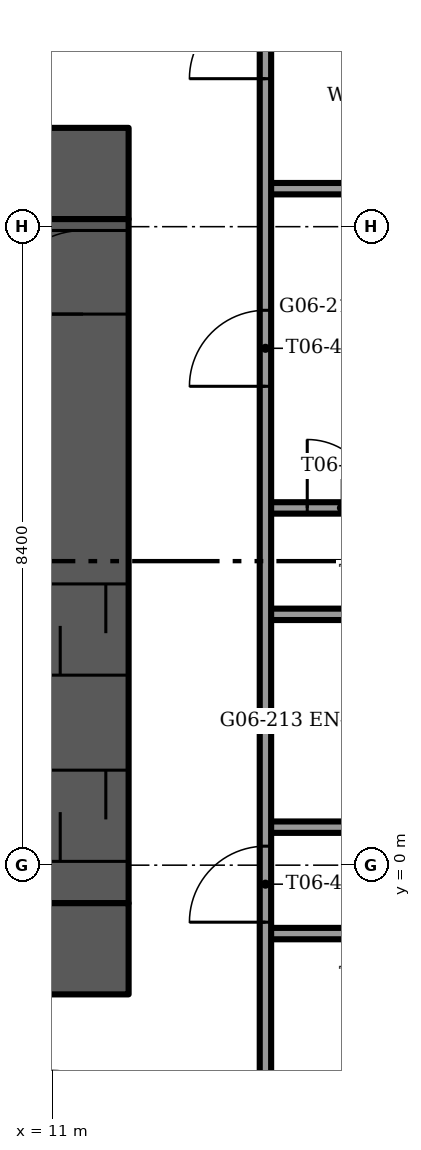
"""IFC4 building model, lengths in metres.
Left out: names, types, materials, properties, quantities, classifications, styles, units other than length and angle.
Written with IfcOpenShell. Run it as: python <this file> out.ifc"""

import sys

from ifc_helpers import new_model, si_unit, direction, frame, frame_2d, origin, place, context, subcontext, project, spatial, rectangle, extrude, element, fill, save


model = new_model("IFC4")
c1 = context("Model", 3, precision=1e-05, world=origin(), true_north=direction((0.0, 1.0)))
c2 = subcontext(c1, "Body", "Model", "MODEL_VIEW")
j1 = project(units=[si_unit("LENGTHUNIT", "METRE"), si_unit("PLANEANGLEUNIT", "RADIAN")], contexts=[c1])
p1 = place(None, origin())
s1 = spatial("IfcSite", under=j1, at=p1, CompositionType="ELEMENT")
p2 = place(p1, origin())
s2 = spatial("IfcBuilding", under=s1, at=p2, CompositionType="ELEMENT")
p3 = place(p2, frame((0.0, 0.0, 28.0)))
s3 = spatial("IfcBuildingStorey", under=s2, at=p3, CompositionType="ELEMENT", Elevation=28.0)
p4 = place(p3, frame((-12.0, -1.1, -0.3), z_axis=(0.0, 0.0, 1.0), x_axis=(1.0, 0.0, 0.0)))
e1 = element("IfcWall", 1, at=p4, inside=s3, PredefinedType="SHEAR", context=c2, shape_type="SweptSolid", body=[
    extrude(rectangle(XDim=24.0, YDim=1.2, at=frame_2d((12.0, 0.0))), origin(), (0.0, 0.0, 1.0), 3.75),
])
p5 = place(p4, frame((11.2, 0.0, 0.0)))
e2 = element("IfcOpeningElement", 2, at=p5, cuts=e1, PredefinedType="OPENING", context=c2, shape_type="SweptSolid", body=[
    extrude(rectangle(XDim=1.6, YDim=2.1, at=frame_2d((0.8, 1.05))), frame((0.0, 0.6, 0.0), z_axis=(0.0, -1.0, 0.0), x_axis=(1.0, 0.0, 0.0)), (0.0, 0.0, 1.0), 1.2),
])
p6 = place(p3, frame((-12.0, 9.1, -0.3), z_axis=(0.0, 0.0, 1.0), x_axis=(1.0, 0.0, 0.0)))
e3 = element("IfcWall", 3, at=p6, inside=s3, PredefinedType="SHEAR", context=c2, shape_type="SweptSolid", body=[
    extrude(rectangle(XDim=24.0, YDim=1.2, at=frame_2d((12.0, 0.0))), origin(), (0.0, 0.0, 1.0), 3.75),
])
p7 = place(p6, frame((11.2, 0.0, 0.0)))
e4 = element("IfcOpeningElement", 4, at=p7, cuts=e3, PredefinedType="OPENING", context=c2, shape_type="SweptSolid", body=[
    extrude(rectangle(XDim=1.6, YDim=2.1, at=frame_2d((0.8, 1.05))), frame((0.0, 0.6, 0.0), z_axis=(0.0, -1.0, 0.0), x_axis=(1.0, 0.0, 0.0)), (0.0, 0.0, 1.0), 1.2),
])
p8 = place(p6, frame((5.25, 0.0, 0.0)))
e5 = element("IfcOpeningElement", 5, at=p8, cuts=e3, PredefinedType="OPENING", context=c2, shape_type="SweptSolid", body=[
    extrude(rectangle(XDim=1.1, YDim=2.1, at=frame_2d((0.55, 1.05))), frame((0.0, 0.6, 0.0), z_axis=(0.0, -1.0, 0.0), x_axis=(1.0, 0.0, 0.0)), (0.0, 0.0, 1.0), 1.2),
])
p9 = place(p6, frame((17.65, 0.0, 0.0)))
e6 = element("IfcOpeningElement", 6, at=p9, cuts=e3, PredefinedType="OPENING", context=c2, shape_type="SweptSolid", body=[
    extrude(rectangle(XDim=1.1, YDim=2.1, at=frame_2d((0.55, 1.05))), frame((0.0, 0.6, 0.0), z_axis=(0.0, -1.0, 0.0), x_axis=(1.0, 0.0, 0.0)), (0.0, 0.0, 1.0), 1.2),
])
p10 = place(p3, frame((11.4, -0.5, -0.3), z_axis=(0.0, 0.0, 1.0), x_axis=(0.0, 1.0, 0.0)))
e7 = element("IfcWall", 7, at=p10, inside=s3, PredefinedType="SHEAR", context=c2, shape_type="SweptSolid", body=[
    extrude(rectangle(XDim=9.0, YDim=1.2, at=frame_2d((4.5, 0.0))), origin(), (0.0, 0.0, 1.0), 3.75),
])
p11 = place(p10, frame((7.75, 0.0, 0.0)))
e8 = element("IfcOpeningElement", 8, at=p11, cuts=e7, PredefinedType="OPENING", context=c2, shape_type="SweptSolid", body=[
    extrude(rectangle(XDim=1.1, YDim=2.1, at=frame_2d((0.55, 1.05))), frame((0.0, 0.6, 0.0), z_axis=(0.0, -1.0, 0.0), x_axis=(1.0, 0.0, 0.0)), (0.0, 0.0, 1.0), 1.2),
])
p12 = place(p10, frame((0.55, 0.0, 0.0)))
e9 = element("IfcOpeningElement", 9, at=p12, cuts=e7, PredefinedType="OPENING", context=c2, shape_type="SweptSolid", body=[
    extrude(rectangle(XDim=1.2, YDim=2.1, at=frame_2d((0.6, 1.05))), frame((0.0, 0.6, 0.0), z_axis=(0.0, -1.0, 0.0), x_axis=(1.0, 0.0, 0.0)), (0.0, 0.0, 1.0), 1.2),
])
p13 = place(p10, frame((3.0, 0.0, 0.0)))
e10 = element("IfcOpeningElement", 10, at=p13, cuts=e7, PredefinedType="OPENING", context=c2, shape_type="SweptSolid", body=[
    extrude(rectangle(XDim=1.2, YDim=2.1, at=frame_2d((0.6, 1.05))), frame((0.0, 0.6, 0.0), z_axis=(0.0, -1.0, 0.0), x_axis=(1.0, 0.0, 0.0)), (0.0, 0.0, 1.0), 1.2),
])
p14 = place(p3, frame((10.945, -17.893, 0.0), z_axis=(0.0, 0.0, 1.0), x_axis=(0.500003237297, 0.866023534722, 0.0)))
e11 = element("IfcWall", 11, at=p14, inside=s3, PredefinedType="SOLIDWALL", context=c2, shape_type="SweptSolid", body=[
    extrude(rectangle(XDim=20.046, YDim=0.15, at=frame_2d((10.023, 0.0))), origin(), (0.0, 0.0, 1.0), 3.45),
])
p15 = place(p14, frame((1.923, 0.0, 0.15)))
e12 = element("IfcOpeningElement", 12, at=p15, cuts=e11, PredefinedType="OPENING", context=c2, shape_type="SweptSolid", body=[
    extrude(rectangle(XDim=1.8, YDim=2.85, at=frame_2d((0.9, 1.425))), frame((0.0, 0.075, 0.0), z_axis=(0.0, -1.0, 0.0), x_axis=(1.0, 0.0, 0.0)), (0.0, 0.0, 1.0), 0.15),
])
p16 = place(p14, frame((4.023, 0.0, 0.0)))
e13 = element("IfcOpeningElement", 13, at=p16, cuts=e11, PredefinedType="OPENING", context=c2, shape_type="SweptSolid", body=[
    extrude(rectangle(XDim=1.5, YDim=2.4, at=frame_2d((0.75, 1.2))), frame((0.0, 0.075, 0.0), z_axis=(0.0, -1.0, 0.0), x_axis=(1.0, 0.0, 0.0)), (0.0, 0.0, 1.0), 0.15),
])
p17 = place(p14, frame((6.123, 0.0, 0.15)))
e14 = element("IfcOpeningElement", 14, at=p17, cuts=e11, PredefinedType="OPENING", context=c2, shape_type="SweptSolid", body=[
    extrude(rectangle(XDim=1.8, YDim=2.85, at=frame_2d((0.9, 1.425))), frame((0.0, 0.075, 0.0), z_axis=(0.0, -1.0, 0.0), x_axis=(1.0, 0.0, 0.0)), (0.0, 0.0, 1.0), 0.15),
])
p18 = place(p14, frame((8.223, 0.0, 0.0)))
e15 = element("IfcOpeningElement", 15, at=p18, cuts=e11, PredefinedType="OPENING", context=c2, shape_type="SweptSolid", body=[
    extrude(rectangle(XDim=1.5, YDim=2.4, at=frame_2d((0.75, 1.2))), frame((0.0, 0.075, 0.0), z_axis=(0.0, -1.0, 0.0), x_axis=(1.0, 0.0, 0.0)), (0.0, 0.0, 1.0), 0.15),
])
p19 = place(p14, frame((10.323, 0.0, 0.15)))
e16 = element("IfcOpeningElement", 16, at=p19, cuts=e11, PredefinedType="OPENING", context=c2, shape_type="SweptSolid", body=[
    extrude(rectangle(XDim=1.8, YDim=2.85, at=frame_2d((0.9, 1.425))), frame((0.0, 0.075, 0.0), z_axis=(0.0, -1.0, 0.0), x_axis=(1.0, 0.0, 0.0)), (0.0, 0.0, 1.0), 0.15),
])
p20 = place(p14, frame((12.423, 0.0, 0.0)))
e17 = element("IfcOpeningElement", 17, at=p20, cuts=e11, PredefinedType="OPENING", context=c2, shape_type="SweptSolid", body=[
    extrude(rectangle(XDim=1.5, YDim=2.4, at=frame_2d((0.75, 1.2))), frame((0.0, 0.075, 0.0), z_axis=(0.0, -1.0, 0.0), x_axis=(1.0, 0.0, 0.0)), (0.0, 0.0, 1.0), 0.15),
])
p21 = place(p14, frame((14.523, 0.0, 0.15)))
e18 = element("IfcOpeningElement", 18, at=p21, cuts=e11, PredefinedType="OPENING", context=c2, shape_type="SweptSolid", body=[
    extrude(rectangle(XDim=0.9, YDim=2.85, at=frame_2d((0.45, 1.425))), frame((0.0, 0.075, 0.0), z_axis=(0.0, -1.0, 0.0), x_axis=(1.0, 0.0, 0.0)), (0.0, 0.0, 1.0), 0.15),
])
p22 = place(p14, frame((0.311, 0.0, 0.15)))
e19 = element("IfcOpeningElement", 19, at=p22, cuts=e11, PredefinedType="OPENING", context=c2, shape_type="SweptSolid", body=[
    extrude(rectangle(XDim=0.9, YDim=2.73, at=frame_2d((0.45, 1.365))), frame((0.0, 0.075, 0.0), z_axis=(0.0, -1.0, 0.0), x_axis=(1.0, 0.0, 0.0)), (0.0, 0.0, 1.0), 0.15),
])
p23 = place(p14, frame((18.834, 0.0, 0.15)))
e20 = element("IfcOpeningElement", 20, at=p23, cuts=e11, PredefinedType="OPENING", context=c2, shape_type="SweptSolid", body=[
    extrude(rectangle(XDim=0.9, YDim=2.73, at=frame_2d((0.45, 1.365))), frame((0.0, 0.075, 0.0), z_axis=(0.0, -1.0, 0.0), x_axis=(1.0, 0.0, 0.0)), (0.0, 0.0, 1.0), 0.15),
])
p24 = place(p3, frame((20.968, 0.532, 0.0), z_axis=(0.0, 0.0, 1.0), x_axis=(-0.500000010132, 0.866025397935, 0.0)))
e21 = element("IfcWall", 21, at=p24, inside=s3, PredefinedType="SOLIDWALL", context=c2, shape_type="SweptSolid", body=[
    extrude(rectangle(XDim=22.817, YDim=0.15, at=frame_2d((11.408, 0.0))), origin(), (0.0, 0.0, 1.0), 3.45),
])
p25 = place(p24, frame((5.136, 0.0, 0.15)))
e22 = element("IfcOpeningElement", 22, at=p25, cuts=e21, PredefinedType="OPENING", context=c2, shape_type="SweptSolid", body=[
    extrude(rectangle(XDim=0.9, YDim=2.85, at=frame_2d((0.45, 1.425))), frame((0.0, 0.075, 0.0), z_axis=(0.0, -1.0, 0.0), x_axis=(1.0, 0.0, 0.0)), (0.0, 0.0, 1.0), 0.15),
])
p26 = place(p24, frame((6.123, 0.0, 0.0)))
e23 = element("IfcOpeningElement", 23, at=p26, cuts=e21, PredefinedType="OPENING", context=c2, shape_type="SweptSolid", body=[
    extrude(rectangle(XDim=1.5, YDim=2.4, at=frame_2d((0.75, 1.2))), frame((0.0, 0.075, 0.0), z_axis=(0.0, -1.0, 0.0), x_axis=(1.0, 0.0, 0.0)), (0.0, 0.0, 1.0), 0.15),
])
p27 = place(p24, frame((8.223, 0.0, 0.15)))
e24 = element("IfcOpeningElement", 24, at=p27, cuts=e21, PredefinedType="OPENING", context=c2, shape_type="SweptSolid", body=[
    extrude(rectangle(XDim=0.9, YDim=2.85, at=frame_2d((0.45, 1.425))), frame((0.0, 0.075, 0.0), z_axis=(0.0, -1.0, 0.0), x_axis=(1.0, 0.0, 0.0)), (0.0, 0.0, 1.0), 0.15),
])
p28 = place(p24, frame((10.323, 0.0, 0.15)))
e25 = element("IfcOpeningElement", 25, at=p28, cuts=e21, PredefinedType="OPENING", context=c2, shape_type="SweptSolid", body=[
    extrude(rectangle(XDim=1.5, YDim=2.85, at=frame_2d((0.75, 1.425))), frame((0.0, 0.075, 0.0), z_axis=(0.0, -1.0, 0.0), x_axis=(1.0, 0.0, 0.0)), (0.0, 0.0, 1.0), 0.15),
])
p29 = place(p24, frame((14.764, 0.0, 0.15)))
e26 = element("IfcOpeningElement", 26, at=p29, cuts=e21, PredefinedType="OPENING", context=c2, shape_type="SweptSolid", body=[
    extrude(rectangle(XDim=0.9, YDim=2.85, at=frame_2d((0.45, 1.425))), frame((0.0, 0.075, 0.0), z_axis=(0.0, -1.0, 0.0), x_axis=(1.0, 0.0, 0.0)), (0.0, 0.0, 1.0), 0.15),
])
p30 = place(p24, frame((12.564, 0.0, 0.15)))
e27 = element("IfcOpeningElement", 27, at=p30, cuts=e21, PredefinedType="OPENING", context=c2, shape_type="SweptSolid", body=[
    extrude(rectangle(XDim=1.5, YDim=2.85, at=frame_2d((0.75, 1.425))), frame((0.0, 0.075, 0.0), z_axis=(0.0, -1.0, 0.0), x_axis=(1.0, 0.0, 0.0)), (0.0, 0.0, 1.0), 0.15),
])
p31 = place(p24, frame((18.294, 0.0, 0.15)))
e28 = element("IfcOpeningElement", 28, at=p31, cuts=e21, PredefinedType="OPENING", context=c2, shape_type="SweptSolid", body=[
    extrude(rectangle(XDim=1.5, YDim=2.85, at=frame_2d((0.75, 1.425))), frame((0.0, 0.075, 0.0), z_axis=(0.0, -1.0, 0.0), x_axis=(1.0, 0.0, 0.0)), (0.0, 0.0, 1.0), 0.15),
])
p32 = place(p24, frame((0.993, 0.0, 0.15)))
e29 = element("IfcOpeningElement", 29, at=p32, cuts=e21, PredefinedType="OPENING", context=c2, shape_type="SweptSolid", body=[
    extrude(rectangle(XDim=1.8, YDim=2.73, at=frame_2d((0.9, 1.365))), frame((0.0, 0.075, 0.0), z_axis=(0.0, -1.0, 0.0), x_axis=(1.0, 0.0, 0.0)), (0.0, 0.0, 1.0), 0.15),
])
p33 = place(p24, frame((20.82, 0.0, 0.15)))
e30 = element("IfcOpeningElement", 30, at=p33, cuts=e21, PredefinedType="OPENING", context=c2, shape_type="SweptSolid", body=[
    extrude(rectangle(XDim=1.8, YDim=2.73, at=frame_2d((0.9, 1.365))), frame((0.0, 0.075, 0.0), z_axis=(0.0, -1.0, 0.0), x_axis=(1.0, 0.0, 0.0)), (0.0, 0.0, 1.0), 0.15),
])
p34 = place(p3, frame((13.8, -0.9, 0.0), z_axis=(0.0, 0.0, 1.0), x_axis=(1.0, 0.0, 0.0)))
e31 = element("IfcWall", 31, at=p34, inside=s3, PredefinedType="PARTITIONING", context=c2, shape_type="SweptSolid", body=[
    extrude(rectangle(XDim=3.0, YDim=0.15, at=frame_2d((1.5, 0.0))), origin(), (0.0, 0.0, 1.0), 3.45),
])
p35 = place(p34, frame((1.1, 0.0, 0.0)))
e32 = element("IfcOpeningElement", 32, at=p35, cuts=e31, PredefinedType="OPENING", context=c2, shape_type="SweptSolid", body=[
    extrude(rectangle(XDim=0.8, YDim=2.1, at=frame_2d((0.4, 1.05))), frame((0.0, 0.075, 0.0), z_axis=(0.0, -1.0, 0.0), x_axis=(1.0, 0.0, 0.0)), (0.0, 0.0, 1.0), 0.15),
])
p36 = place(p3, frame((13.8, 0.5, 0.0), z_axis=(0.0, 0.0, 1.0), x_axis=(1.0, 0.0, 0.0)))
e33 = element("IfcWall", 33, at=p36, inside=s3, PredefinedType="PARTITIONING", context=c2, shape_type="SweptSolid", body=[
    extrude(rectangle(XDim=7.186, YDim=0.15, at=frame_2d((3.593, 0.0))), origin(), (0.0, 0.0, 1.0), 3.45),
])
p37 = place(p3, frame((13.8, 3.3, 0.0), z_axis=(0.0, 0.0, 1.0), x_axis=(1.0, 0.0, 0.0)))
e34 = element("IfcWall", 34, at=p37, inside=s3, PredefinedType="PARTITIONING", context=c2, shape_type="SweptSolid", body=[
    extrude(rectangle(XDim=3.0, YDim=0.15, at=frame_2d((1.5, 0.0))), origin(), (0.0, 0.0, 1.0), 3.45),
])
p38 = place(p37, frame((1.1, 0.0, 0.0)))
e35 = element("IfcOpeningElement", 35, at=p38, cuts=e34, PredefinedType="OPENING", context=c2, shape_type="SweptSolid", body=[
    extrude(rectangle(XDim=0.8, YDim=2.1, at=frame_2d((0.4, 1.05))), frame((0.0, 0.075, 0.0), z_axis=(0.0, -1.0, 0.0), x_axis=(1.0, 0.0, 0.0)), (0.0, 0.0, 1.0), 0.15),
])
p39 = place(p3, frame((13.8, 4.7, 0.0), z_axis=(0.0, 0.0, 1.0), x_axis=(1.0, 0.0, 0.0)))
e36 = element("IfcWall", 36, at=p39, inside=s3, PredefinedType="PARTITIONING", context=c2, shape_type="SweptSolid", body=[
    extrude(rectangle(XDim=4.814, YDim=0.15, at=frame_2d((2.407, 0.0))), origin(), (0.0, 0.0, 1.0), 3.45),
])
p40 = place(p39, frame((0.55, 0.0, 0.0)))
e37 = element("IfcOpeningElement", 37, at=p40, cuts=e36, PredefinedType="OPENING", context=c2, shape_type="SweptSolid", body=[
    extrude(rectangle(XDim=0.9, YDim=2.1, at=frame_2d((0.45, 1.05))), frame((0.0, 0.075, 0.0), z_axis=(0.0, -1.0, 0.0), x_axis=(1.0, 0.0, 0.0)), (0.0, 0.0, 1.0), 0.15),
])
p41 = place(p3, frame((13.8, 8.9, 0.0), z_axis=(0.0, 0.0, 1.0), x_axis=(1.0, 0.0, 0.0)))
e38 = element("IfcWall", 38, at=p41, inside=s3, PredefinedType="PARTITIONING", context=c2, shape_type="SweptSolid", body=[
    extrude(rectangle(XDim=2.389, YDim=0.15, at=frame_2d((1.194, 0.0))), origin(), (0.0, 0.0, 1.0), 3.45),
])
p42 = place(p3, frame((13.8, -3.7, 0.0), z_axis=(0.0, 0.0, 1.0), x_axis=(0.0, 1.0, 0.0)))
e39 = element("IfcWall", 39, at=p42, inside=s3, PredefinedType="PARTITIONING", context=c2, shape_type="SweptSolid", body=[
    extrude(rectangle(XDim=16.738, YDim=0.15, at=frame_2d((8.369, 0.0))), origin(), (0.0, 0.0, 1.0), 3.45),
])
p43 = place(p42, frame((2.95, 0.0, 0.0)))
e40 = element("IfcOpeningElement", 40, at=p43, cuts=e39, PredefinedType="OPENING", context=c2, shape_type="SweptSolid", body=[
    extrude(rectangle(XDim=1.0, YDim=2.1, at=frame_2d((0.5, 1.05))), frame((0.0, 0.075, 0.0), z_axis=(0.0, -1.0, 0.0), x_axis=(1.0, 0.0, 0.0)), (0.0, 0.0, 1.0), 0.15),
])
p44 = place(p42, frame((10.0, 0.0, 0.0)))
e41 = element("IfcOpeningElement", 41, at=p44, cuts=e39, PredefinedType="OPENING", context=c2, shape_type="SweptSolid", body=[
    extrude(rectangle(XDim=1.0, YDim=2.1, at=frame_2d((0.5, 1.05))), frame((0.0, 0.075, 0.0), z_axis=(0.0, -1.0, 0.0), x_axis=(1.0, 0.0, 0.0)), (0.0, 0.0, 1.0), 0.15),
])
p45 = place(p42, frame((14.047, 0.0, 0.0)))
e42 = element("IfcOpeningElement", 42, at=p45, cuts=e39, PredefinedType="OPENING", context=c2, shape_type="SweptSolid", body=[
    extrude(rectangle(XDim=1.0, YDim=2.1, at=frame_2d((0.5, 1.05))), frame((0.0, 0.075, 0.0), z_axis=(0.0, -1.0, 0.0), x_axis=(1.0, 0.0, 0.0)), (0.0, 0.0, 1.0), 0.15),
])
p46 = place(p11, origin())
e43 = element("IfcDoor", 43, at=p46, inside=s3, OperationType="SINGLE_SWING_RIGHT", PredefinedType="DOOR", context=c2, shape_type="SweptSolid", body=[
    extrude(rectangle(XDim=1.1, YDim=2.1, at=frame_2d((0.55, 1.05))), frame((0.0, 0.025, 0.0), z_axis=(0.0, -1.0, 0.0), x_axis=(1.0, 0.0, 0.0)), (0.0, 0.0, 1.0), 0.05),
])
fill(e8, e43)
p47 = place(p12, origin())
e44 = element("IfcDoor", 44, at=p47, inside=s3, OperationType="SLIDING_TO_LEFT", PredefinedType="DOOR", context=c2, shape_type="SweptSolid", body=[
    extrude(rectangle(XDim=1.2, YDim=2.1, at=frame_2d((0.6, 1.05))), frame((0.0, 0.025, 0.0), z_axis=(0.0, -1.0, 0.0), x_axis=(1.0, 0.0, 0.0)), (0.0, 0.0, 1.0), 0.05),
])
fill(e9, e44)
p48 = place(p13, origin())
e45 = element("IfcDoor", 45, at=p48, inside=s3, OperationType="SLIDING_TO_LEFT", PredefinedType="DOOR", context=c2, shape_type="SweptSolid", body=[
    extrude(rectangle(XDim=1.2, YDim=2.1, at=frame_2d((0.6, 1.05))), frame((0.0, 0.025, 0.0), z_axis=(0.0, -1.0, 0.0), x_axis=(1.0, 0.0, 0.0)), (0.0, 0.0, 1.0), 0.05),
])
fill(e10, e45)
p49 = place(p43, origin())
e46 = element("IfcDoor", 46, at=p49, inside=s3, OperationType="SINGLE_SWING_RIGHT", PredefinedType="DOOR", context=c2, shape_type="SweptSolid", body=[
    extrude(rectangle(XDim=1.0, YDim=2.1, at=frame_2d((0.5, 1.05))), frame((0.0, 0.025, 0.0), z_axis=(0.0, -1.0, 0.0), x_axis=(1.0, 0.0, 0.0)), (0.0, 0.0, 1.0), 0.05),
])
fill(e40, e46)
p50 = place(p44, origin())
e47 = element("IfcDoor", 47, at=p50, inside=s3, OperationType="SINGLE_SWING_RIGHT", PredefinedType="DOOR", context=c2, shape_type="SweptSolid", body=[
    extrude(rectangle(XDim=1.0, YDim=2.1, at=frame_2d((0.5, 1.05))), frame((0.0, 0.025, 0.0), z_axis=(0.0, -1.0, 0.0), x_axis=(1.0, 0.0, 0.0)), (0.0, 0.0, 1.0), 0.05),
])
fill(e41, e47)
p51 = place(p40, origin())
e48 = element("IfcDoor", 48, at=p51, inside=s3, OperationType="SINGLE_SWING_LEFT", PredefinedType="DOOR", context=c2, shape_type="SweptSolid", body=[
    extrude(rectangle(XDim=0.9, YDim=2.1, at=frame_2d((0.45, 1.05))), frame((0.0, 0.025, 0.0), z_axis=(0.0, -1.0, 0.0), x_axis=(1.0, 0.0, 0.0)), (0.0, 0.0, 1.0), 0.05),
])
fill(e37, e48)
p52 = place(p45, origin())
e49 = element("IfcDoor", 49, at=p52, inside=s3, OperationType="SINGLE_SWING_LEFT", PredefinedType="DOOR", context=c2, shape_type="SweptSolid", body=[
    extrude(rectangle(XDim=1.0, YDim=2.1, at=frame_2d((0.5, 1.05))), frame((0.0, 0.025, 0.0), z_axis=(0.0, -1.0, 0.0), x_axis=(1.0, 0.0, 0.0)), (0.0, 0.0, 1.0), 0.05),
])
fill(e42, e49)
save(model, sys.argv[1])
